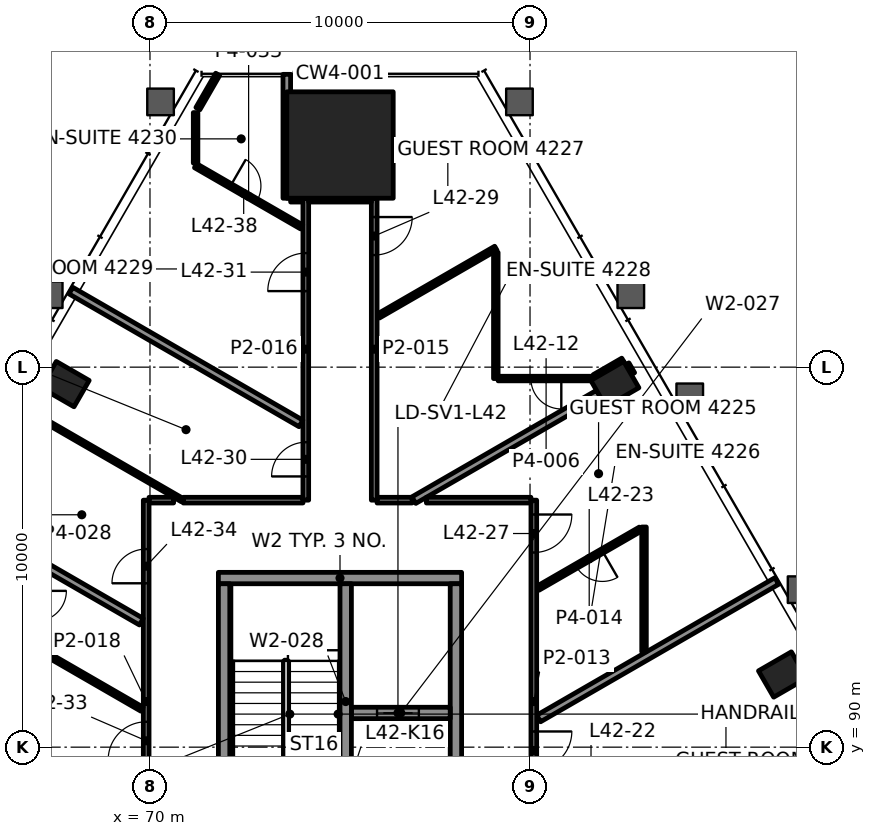
"""IFC4 building model, lengths in metres.
Left out: names, types, materials, properties, quantities, classifications, styles, units other than length and angle.
Written with IfcOpenShell. Run it as: python <this file> out.ifc"""

import sys

from ifc_helpers import new_model, si_unit, direction, frame, frame_2d, origin, origin_2d, place, context, subcontext, project, spatial, rectangle, hollow_rectangle, extrude, element, fill, save


model = new_model("IFC4")
c1 = context("Model", 3, precision=1e-05, world=origin(), true_north=direction((0.0, 1.0)))
c2 = subcontext(c1, "Body", "Model", "MODEL_VIEW")
j1 = project(units=[si_unit("LENGTHUNIT", "METRE"), si_unit("PLANEANGLEUNIT", "RADIAN")], contexts=[c1])
p1 = place(None, origin())
s1 = spatial("IfcSite", under=j1, at=p1, CompositionType="ELEMENT")
p2 = place(p1, origin())
s2 = spatial("IfcBuilding", under=s1, at=p2, CompositionType="ELEMENT")
p3 = place(p2, frame((0.0, 0.0, 183.1)))
s3 = spatial("IfcBuildingStorey", under=s2, at=p3, CompositionType="ELEMENT", Elevation=183.1)
p4 = place(p3, frame((75.0, 105.845, 0.0), z_axis=(0.0, 0.0, 1.0), x_axis=(-1.0, 0.0, 0.0)))
e1 = element("IfcColumn", 1, at=p4, inside=s3, PredefinedType="COLUMN", context=c2, shape_type="SweptSolid", body=[
    extrude(rectangle(XDim=2.8, YDim=2.8, at=origin_2d()), origin(), (0.0, 0.0, 1.0), 3.9),
])
for number, where, z_axis, x_axis in (
    (2, (86.645, 91.912, -0.0), (0.0, 0.0, 1.0), (-0.5, 0.866, 0.0)),
    (3, (82.232, 99.553, -0.0), (0.0, 0.0, 1.0), (-0.5, 0.866, 0.0)),
    (4, (67.768, 99.553, -0.0), (0.0, 0.0, 1.0), (-0.5, -0.866, 0.0)),
):
    element("IfcColumn", number, at=place(p3, frame(where, z_axis=z_axis, x_axis=x_axis)), inside=s3, PredefinedType="COLUMN", context=c2, shape_type="SweptSolid", body=[
        extrude(hollow_rectangle(XDim=0.8, YDim=1.0, WallThickness=0.05, at=origin_2d()), origin(), (0.0, 0.0, 1.0), 3.9),
    ])
p5 = place(p3, frame((71.8, 94.45, 0.0), z_axis=(0.0, 0.0, 1.0), x_axis=(1.0, 0.0, 0.0)))
e5 = element("IfcWall", 5, at=p5, inside=s3, PredefinedType="SHEAR", context=c2, shape_type="SweptSolid", body=[
    extrude(rectangle(XDim=6.4, YDim=0.3, at=frame_2d((3.2, 0.0))), origin(), (0.0, 0.0, 1.0), 3.7),
])
for number, where, z_axis, x_axis in (
    (6, (71.95, 88.1, 0.0), (0.0, 0.0, 1.0), (0.0, 1.0, 0.0)),
    (7, (78.05, 88.1, 0.0), (0.0, 0.0, 1.0), (0.0, 1.0, 0.0)),
):
    element("IfcWall", number, at=place(p3, frame(where, z_axis=z_axis, x_axis=x_axis)), inside=s3, PredefinedType="SHEAR", context=c2, shape_type="SweptSolid", body=[
        extrude(rectangle(XDim=6.2, YDim=0.3, at=frame_2d((3.1, 0.0))), origin(), (0.0, 0.0, 1.0), 3.7),
    ])
p6 = place(p3, frame((75.3, 90.9, 0.0), z_axis=(0.0, 0.0, 1.0), x_axis=(1.0, 0.0, 0.0)))
e8 = element("IfcWall", 8, at=p6, inside=s3, PredefinedType="SHEAR", context=c2, shape_type="SweptSolid", body=[
    extrude(rectangle(XDim=2.6, YDim=0.3, at=frame_2d((1.3, 0.0))), origin(), (0.0, 0.0, 1.0), 3.7),
])
p7 = place(p6, frame((0.675, 0.0, 0.0)))
e9 = element("IfcOpeningElement", 9, at=p7, cuts=e8, PredefinedType="OPENING", context=c2, shape_type="SweptSolid", body=[
    extrude(rectangle(XDim=1.1, YDim=2.1, at=frame_2d((0.55, 1.05))), frame((0.0, 0.16, 0.0), z_axis=(0.0, -1.0, 0.0), x_axis=(1.0, 0.0, 0.0)), (0.0, 0.0, 1.0), 0.32),
])
p8 = place(p3, frame((75.15, 88.1, 0.0), z_axis=(0.0, 0.0, 1.0), x_axis=(0.0, 1.0, 0.0)))
e10 = element("IfcWall", 10, at=p8, inside=s3, PredefinedType="SHEAR", context=c2, shape_type="SweptSolid", body=[
    extrude(rectangle(XDim=6.2, YDim=0.3, at=frame_2d((3.1, 0.0))), origin(), (0.0, 0.0, 1.0), 3.7),
])
p9 = place(p8, frame((0.185, 0.0, 0.0)))
e11 = element("IfcOpeningElement", 11, at=p9, cuts=e10, PredefinedType="OPENING", context=c2, shape_type="SweptSolid", body=[
    extrude(rectangle(XDim=1.0, YDim=2.1, at=frame_2d((0.5, 1.05))), frame((0.0, 0.16, 0.0), z_axis=(0.0, -1.0, 0.0), x_axis=(1.0, 0.0, 0.0)), (0.0, 0.0, 1.0), 0.32),
])
p10 = place(p3, frame((69.975, 96.5, 0.0), z_axis=(0.0, 0.0, 1.0), x_axis=(1.0, 0.0, 0.0)))
e12 = element("IfcWall", 12, at=p10, inside=s3, PredefinedType="PARTITIONING", context=c2, shape_type="SweptSolid", body=[
    extrude(rectangle(XDim=0.646, YDim=0.15, at=frame_2d((0.323, 0.0))), origin(), (0.0, 0.0, 1.0), 3.1),
])
p11 = place(p3, frame((75.975, 96.5, 0.0), z_axis=(0.0, 0.0, 1.0), x_axis=(1.0, 0.0, 0.0)))
e13 = element("IfcWall", 13, at=p11, inside=s3, PredefinedType="PARTITIONING", context=c2, shape_type="SweptSolid", body=[
    extrude(rectangle(XDim=0.925, YDim=0.15, at=frame_2d((0.463, 0.0))), origin(), (0.0, 0.0, 1.0), 3.1),
])
p12 = place(p3, frame((81.686, 99.7, 0.0), z_axis=(0.0, 0.0, 1.0), x_axis=(-1.0, 0.0, 0.0)))
e14 = element("IfcWall", 14, at=p12, inside=s3, PredefinedType="PARTITIONING", context=c2, shape_type="SweptSolid", body=[
    extrude(rectangle(XDim=2.526, YDim=0.12, at=frame_2d((1.263, 0.0))), origin(), (0.0, 0.0, 1.0), 3.1),
])
p13 = place(p12, frame((0.863, 0.0, 0.0)))
e15 = element("IfcOpeningElement", 15, at=p13, cuts=e14, PredefinedType="OPENING", context=c2, shape_type="SweptSolid", body=[
    extrude(rectangle(XDim=0.8, YDim=2.1, at=frame_2d((0.4, 1.05))), frame((0.0, 0.07, 0.0), z_axis=(0.0, -1.0, 0.0), x_axis=(1.0, 0.0, 0.0)), (0.0, 0.0, 1.0), 0.14),
])
p14 = place(p3, frame((73.7, 104.445, 0.0), z_axis=(0.0, 0.0, 1.0), x_axis=(1.0, 0.0, 0.0)))
e16 = element("IfcWall", 16, at=p14, inside=s3, PredefinedType="PARTITIONING", context=c2, shape_type="SweptSolid", body=[
    extrude(rectangle(XDim=0.324, YDim=0.2, at=frame_2d((0.162, 0.0))), origin(), (0.0, 0.0, 1.0), 3.1),
])
p15 = place(p3, frame((80.227, 90.754, 0.0), z_axis=(0.0, 0.0, 1.0), x_axis=(0.866019288795, 0.500010591322, 0.0)))
e17 = element("IfcWall", 17, at=p15, inside=s3, PredefinedType="PARTITIONING", context=c2, shape_type="SweptSolid", body=[
    extrude(rectangle(XDim=7.237, YDim=0.2, at=frame_2d((3.618, 0.0))), origin(), (0.0, 0.0, 1.0), 3.022),
])
p16 = place(p3, frame((82.905, 95.739, 0.0), z_axis=(0.0, 0.0, 1.0), x_axis=(-0.866028856698, -0.499994019331, 0.0)))
e18 = element("IfcWall", 18, at=p16, inside=s3, PredefinedType="PARTITIONING", context=c2, shape_type="SweptSolid", body=[
    extrude(rectangle(XDim=3.113, YDim=0.12, at=frame_2d((1.556, 0.0))), origin(), (0.0, 0.0, 1.0), 3.1),
])
p17 = place(p16, frame((1.156, 0.0, 0.0)))
e19 = element("IfcOpeningElement", 19, at=p17, cuts=e18, PredefinedType="OPENING", context=c2, shape_type="SweptSolid", body=[
    extrude(rectangle(XDim=0.8, YDim=2.1, at=frame_2d((0.4, 1.05))), frame((0.0, 0.07, 0.0), z_axis=(0.0, -1.0, 0.0), x_axis=(1.0, 0.0, 0.0)), (0.0, 0.0, 1.0), 0.14),
])
p18 = place(p3, frame((76.943, 96.5, 0.0), z_axis=(0.0, 0.0, 1.0), x_axis=(0.866015917575, 0.500016430238, 0.0)))
e20 = element("IfcWall", 20, at=p18, inside=s3, PredefinedType="PARTITIONING", context=c2, shape_type="SweptSolid", body=[
    extrude(rectangle(XDim=5.607, YDim=0.2, at=frame_2d((2.804, 0.0))), origin(), (0.0, 0.0, 1.0), 3.1),
])
p19 = place(p3, frame((81.712, 99.715, 0.0), z_axis=(0.0, 0.0, 1.0), x_axis=(0.866092063448, 0.499884524299, 0.0)))
e21 = element("IfcWall", 21, at=p19, inside=s3, PredefinedType="PARTITIONING", context=c2, shape_type="SweptSolid", body=[
    extrude(rectangle(XDim=0.869, YDim=0.2, at=frame_2d((0.435, 0.0))), origin(), (0.0, 0.0, 1.0), 3.1),
])
p20 = place(p3, frame((76.01, 101.346, 0.0), z_axis=(0.0, 0.0, 1.0), x_axis=(0.866045460162, 0.499965259726, 0.0)))
e22 = element("IfcWall", 22, at=p20, inside=s3, PredefinedType="PARTITIONING", context=c2, shape_type="SweptSolid", body=[
    extrude(rectangle(XDim=3.569, YDim=0.12, at=frame_2d((1.784, 0.0))), origin(), (0.0, 0.0, 1.0), 3.1),
])
p21 = place(p3, frame((71.26, 106.802, 0.0), z_axis=(0.0, 0.0, 1.0), x_axis=(0.500094169602, 0.865971028112, 0.0)))
e23 = element("IfcWall", 23, at=p21, inside=s3, PredefinedType="PARTITIONING", context=c2, shape_type="SweptSolid", body=[
    extrude(rectangle(XDim=1.042, YDim=0.12, at=frame_2d((0.521, 0.0))), origin(), (0.0, 0.0, 1.0), 3.1),
])
p22 = place(p3, frame((83.0, 92.51, 0.0), z_axis=(0.0, 0.0, 1.0), x_axis=(0.0, 1.0, 0.0)))
e24 = element("IfcWall", 24, at=p22, inside=s3, PredefinedType="PARTITIONING", context=c2, shape_type="SweptSolid", body=[
    extrude(rectangle(XDim=3.283, YDim=0.12, at=frame_2d((1.642, 0.0))), origin(), (0.0, 0.0, 1.0), 3.1),
])
p23 = place(p3, frame((80.1, 96.5, 0.0), z_axis=(0.0, 0.0, 1.0), x_axis=(0.0, -1.0, 0.0)))
e25 = element("IfcWall", 25, at=p23, inside=s3, PredefinedType="PARTITIONING", context=c2, shape_type="SweptSolid", body=[
    extrude(rectangle(XDim=10.6, YDim=0.15, at=frame_2d((5.3, 0.0))), origin(), (0.0, 0.0, 1.0), 3.022),
])
p24 = place(p23, frame((0.377, 0.0, 0.0)))
e26 = element("IfcOpeningElement", 26, at=p24, cuts=e25, PredefinedType="OPENING", context=c2, shape_type="SweptSolid", body=[
    extrude(rectangle(XDim=1.0, YDim=2.1, at=frame_2d((0.5, 1.05))), frame((0.0, 0.085, 0.0), z_axis=(0.0, -1.0, 0.0), x_axis=(1.0, 0.0, 0.0)), (0.0, 0.0, 1.0), 0.17),
])
p25 = place(p23, frame((6.087, 0.0, 0.0)))
e27 = element("IfcOpeningElement", 27, at=p25, cuts=e25, PredefinedType="OPENING", context=c2, shape_type="SweptSolid", body=[
    extrude(rectangle(XDim=1.0, YDim=2.1, at=frame_2d((0.5, 1.05))), frame((0.0, 0.085, 0.0), z_axis=(0.0, -1.0, 0.0), x_axis=(1.0, 0.0, 0.0)), (0.0, 0.0, 1.0), 0.17),
])
p26 = place(p3, frame((79.1, 99.7, 0.0), z_axis=(0.0, 0.0, 1.0), x_axis=(0.0, 1.0, 0.0)))
e28 = element("IfcWall", 28, at=p26, inside=s3, PredefinedType="PARTITIONING", context=c2, shape_type="SweptSolid", body=[
    extrude(rectangle(XDim=3.321, YDim=0.12, at=frame_2d((1.661, 0.0))), origin(), (0.0, 0.0, 1.0), 3.1),
])
p27 = place(p3, frame((75.9, 104.445, 0.0), z_axis=(0.0, 0.0, 1.0), x_axis=(0.0, -1.0, 0.0)))
e29 = element("IfcWall", 29, at=p27, inside=s3, PredefinedType="PARTITIONING", context=c2, shape_type="SweptSolid", body=[
    extrude(rectangle(XDim=7.945, YDim=0.15, at=frame_2d((3.972, 0.0))), origin(), (0.0, 0.0, 1.0), 3.1),
])
p28 = place(p27, frame((0.495, 0.0, 0.0)))
e30 = element("IfcOpeningElement", 30, at=p28, cuts=e29, PredefinedType="OPENING", context=c2, shape_type="SweptSolid", body=[
    extrude(rectangle(XDim=1.0, YDim=2.1, at=frame_2d((0.5, 1.05))), frame((0.0, 0.085, 0.0), z_axis=(0.0, -1.0, 0.0), x_axis=(1.0, 0.0, 0.0)), (0.0, 0.0, 1.0), 0.17),
])
p29 = place(p3, frame((74.1, 96.5, 0.0), z_axis=(0.0, 0.0, 1.0), x_axis=(0.0, 1.0, 0.0)))
e31 = element("IfcWall", 31, at=p29, inside=s3, PredefinedType="PARTITIONING", context=c2, shape_type="SweptSolid", body=[
    extrude(rectangle(XDim=7.945, YDim=0.15, at=frame_2d((3.973, 0.0))), origin(), (0.0, 0.0, 1.0), 3.1),
])
p30 = place(p29, frame((0.624, 0.0, 0.0)))
e32 = element("IfcOpeningElement", 32, at=p30, cuts=e31, PredefinedType="OPENING", context=c2, shape_type="SweptSolid", body=[
    extrude(rectangle(XDim=0.9, YDim=2.1, at=frame_2d((0.45, 1.05))), frame((0.0, 0.085, 0.0), z_axis=(0.0, -1.0, 0.0), x_axis=(1.0, 0.0, 0.0)), (0.0, 0.0, 1.0), 0.17),
])
p31 = place(p29, frame((5.501, 0.0, 0.0)))
e33 = element("IfcOpeningElement", 33, at=p31, cuts=e31, PredefinedType="OPENING", context=c2, shape_type="SweptSolid", body=[
    extrude(rectangle(XDim=1.0, YDim=2.1, at=frame_2d((0.5, 1.05))), frame((0.0, 0.085, 0.0), z_axis=(0.0, -1.0, 0.0), x_axis=(1.0, 0.0, 0.0)), (0.0, 0.0, 1.0), 0.17),
])
p32 = place(p3, frame((73.6, 104.446, 0.0), z_axis=(0.0, 0.0, 1.0), x_axis=(0.0, 1.0, 0.0)))
e34 = element("IfcWall", 34, at=p32, inside=s3, PredefinedType="PARTITIONING", context=c2, shape_type="SweptSolid", body=[
    extrude(rectangle(XDim=3.259, YDim=0.2, at=frame_2d((1.63, 0.0))), origin(), (0.0, 0.0, 1.0), 3.1),
])
p33 = place(p3, frame((71.2, 105.369, 0.0), z_axis=(0.0, 0.0, 1.0), x_axis=(0.0, 1.0, 0.0)))
e35 = element("IfcWall", 35, at=p33, inside=s3, PredefinedType="PARTITIONING", context=c2, shape_type="SweptSolid", body=[
    extrude(rectangle(XDim=1.329, YDim=0.12, at=frame_2d((0.665, 0.0))), origin(), (0.0, 0.0, 1.0), 3.1),
])
p34 = place(p3, frame((69.9, 85.9, 0.0), z_axis=(0.0, 0.0, 1.0), x_axis=(0.0, 1.0, 0.0)))
e36 = element("IfcWall", 36, at=p34, inside=s3, PredefinedType="PARTITIONING", context=c2, shape_type="SweptSolid", body=[
    extrude(rectangle(XDim=10.6, YDim=0.15, at=frame_2d((5.3, 0.0))), origin(), (0.0, 0.0, 1.0), 3.022),
])
p35 = place(p34, frame((3.767, 0.0, 0.0)))
e37 = element("IfcOpeningElement", 37, at=p35, cuts=e36, PredefinedType="OPENING", context=c2, shape_type="SweptSolid", body=[
    extrude(rectangle(XDim=1.0, YDim=2.1, at=frame_2d((0.5, 1.05))), frame((0.0, 0.085, 0.0), z_axis=(0.0, -1.0, 0.0), x_axis=(1.0, 0.0, 0.0)), (0.0, 0.0, 1.0), 0.17),
])
p36 = place(p34, frame((8.412, 0.0, 0.0)))
e38 = element("IfcOpeningElement", 38, at=p36, cuts=e36, PredefinedType="OPENING", context=c2, shape_type="SweptSolid", body=[
    extrude(rectangle(XDim=0.9, YDim=2.1, at=frame_2d((0.45, 1.05))), frame((0.0, 0.085, 0.0), z_axis=(0.0, -1.0, 0.0), x_axis=(1.0, 0.0, 0.0)), (0.0, 0.0, 1.0), 0.17),
])
p37 = place(p3, frame((82.665, 99.803, 0.0), z_axis=(0.0, 0.0, 1.0), x_axis=(-0.499910707084, 0.866076950936, 0.0)))
e39 = element("IfcWall", 39, at=p37, inside=s3, PredefinedType="PARTITIONING", context=c2, shape_type="SweptSolid", body=[
    extrude(rectangle(XDim=0.299, YDim=0.2, at=frame_2d((0.15, 0.0))), origin(), (0.0, 0.0, 1.0), 3.1),
])
p38 = place(p3, frame((71.2, 105.301, 0.0), z_axis=(0.0, 0.0, 1.0), x_axis=(0.866010186656, -0.500026355914, 0.0)))
e40 = element("IfcWall", 40, at=p38, inside=s3, PredefinedType="PARTITIONING", context=c2, shape_type="SweptSolid", body=[
    extrude(rectangle(XDim=3.222, YDim=0.12, at=frame_2d((1.611, 0.0))), origin(), (0.0, 0.0, 1.0), 3.1),
])
p39 = place(p38, frame((1.061, 0.0, 0.0)))
e41 = element("IfcOpeningElement", 41, at=p39, cuts=e40, PredefinedType="OPENING", context=c2, shape_type="SweptSolid", body=[
    extrude(rectangle(XDim=0.8, YDim=2.1, at=frame_2d((0.4, 1.05))), frame((0.0, 0.07, 0.0), z_axis=(0.0, -1.0, 0.0), x_axis=(1.0, 0.0, 0.0)), (0.0, 0.0, 1.0), 0.14),
])
p40 = place(p3, frame((73.973, 98.518, 0.0), z_axis=(0.0, 0.0, 1.0), x_axis=(-0.866016957496, 0.500014629116, 0.0)))
e42 = element("IfcWall", 42, at=p40, inside=s3, PredefinedType="PARTITIONING", context=c2, shape_type="SweptSolid", body=[
    extrude(rectangle(XDim=6.992, YDim=0.2, at=frame_2d((3.496, 0.0))), origin(), (0.0, 0.0, 1.0), 3.1),
])
p41 = place(p3, frame((70.851, 96.5, 0.0), z_axis=(0.0, 0.0, 1.0), x_axis=(-0.866016914842, 0.500014702992, 0.0)))
e43 = element("IfcWall", 43, at=p41, inside=s3, PredefinedType="PARTITIONING", context=c2, shape_type="SweptSolid", body=[
    extrude(rectangle(XDim=4.797, YDim=0.1, at=frame_2d((2.398, 0.0))), origin(), (0.0, 0.0, 1.0), 3.022),
])
p42 = place(p3, frame((69.773, 93.302, 0.0), z_axis=(0.0, 0.0, 1.0), x_axis=(-0.866046692957, 0.499963124258, 0.0)))
e44 = element("IfcWall", 44, at=p42, inside=s3, PredefinedType="PARTITIONING", context=c2, shape_type="SweptSolid", body=[
    extrude(rectangle(XDim=4.01, YDim=0.2, at=frame_2d((2.005, 0.0))), origin(), (0.0, 0.0, 1.0), 3.1),
])
p43 = place(p3, frame((69.79, 90.998, 0.0), z_axis=(0.0, 0.0, 1.0), x_axis=(-0.866029130051, 0.499993545862, 0.0)))
e45 = element("IfcWall", 45, at=p43, inside=s3, PredefinedType="PARTITIONING", context=c2, shape_type="SweptSolid", body=[
    extrude(rectangle(XDim=3.222, YDim=0.12, at=frame_2d((1.611, 0.0))), origin(), (0.0, 0.0, 1.0), 3.1),
])
p44 = place(p3, frame((69.799, 88.192, 0.0), z_axis=(0.0, 0.0, 1.0), x_axis=(-0.866013353477, 0.500020871164, 0.0)))
e46 = element("IfcWall", 46, at=p44, inside=s3, PredefinedType="PARTITIONING", context=c2, shape_type="SweptSolid", body=[
    extrude(rectangle(XDim=6.94, YDim=0.1, at=frame_2d((3.47, 0.0))), origin(), (0.0, 0.0, 1.0), 3.022),
])
p45 = place(p3, frame((70.875, 96.5, 0.0), z_axis=(0.0, 0.0, 1.0), x_axis=(1.0, 0.0, 0.0)))
e47 = element("IfcWall", 47, at=p45, inside=s3, PredefinedType="PARTITIONING", context=c2, shape_type="SweptSolid", body=[
    extrude(rectangle(XDim=3.149, YDim=0.15, at=frame_2d((1.575, 0.0))), origin(), (0.0, 0.0, 1.0), 3.1),
])
p46 = place(p3, frame((77.273, 96.5, 0.0), z_axis=(0.0, 0.0, 1.0), x_axis=(1.0, 0.0, 0.0)))
e48 = element("IfcWall", 48, at=p46, inside=s3, PredefinedType="PARTITIONING", context=c2, shape_type="SweptSolid", body=[
    extrude(rectangle(XDim=2.752, YDim=0.15, at=frame_2d((1.376, 0.0))), origin(), (0.0, 0.0, 1.0), 3.1),
])
p47 = place(p3, frame((74.175, 104.445, 0.0), z_axis=(0.0, 0.0, 1.0), x_axis=(1.0, 0.0, 0.0)))
e49 = element("IfcWall", 49, at=p47, inside=s3, PredefinedType="PARTITIONING", context=c2, shape_type="SweptSolid", body=[
    extrude(rectangle(XDim=1.649, YDim=0.2, at=frame_2d((0.825, 0.0))), origin(), (0.0, 0.0, 1.0), 3.097),
])
p48 = place(p13, origin())
e50 = element("IfcDoor", 50, at=p48, inside=s3, OperationType="SINGLE_SWING_RIGHT", PredefinedType="DOOR", context=c2, shape_type="SweptSolid", body=[
    extrude(rectangle(XDim=0.8, YDim=2.1, at=frame_2d((0.4, 1.05))), frame((0.0, 0.025, 0.0), z_axis=(0.0, -1.0, 0.0), x_axis=(1.0, 0.0, 0.0)), (0.0, 0.0, 1.0), 0.05),
])
fill(e15, e50)
p49 = place(p17, origin())
e51 = element("IfcDoor", 51, at=p49, inside=s3, OperationType="SINGLE_SWING_RIGHT", PredefinedType="DOOR", context=c2, shape_type="SweptSolid", body=[
    extrude(rectangle(XDim=0.8, YDim=2.1, at=frame_2d((0.4, 1.05))), frame((0.0, 0.025, 0.0), z_axis=(0.0, -1.0, 0.0), x_axis=(1.0, 0.0, 0.0)), (0.0, 0.0, 1.0), 0.05),
])
fill(e19, e51)
p50 = place(p24, origin())
e52 = element("IfcDoor", 52, at=p50, inside=s3, OperationType="SINGLE_SWING_LEFT", PredefinedType="DOOR", context=c2, shape_type="SweptSolid", body=[
    extrude(rectangle(XDim=1.0, YDim=2.1, at=frame_2d((0.5, 1.05))), frame((0.0, 0.025, 0.0), z_axis=(0.0, -1.0, 0.0), x_axis=(1.0, 0.0, 0.0)), (0.0, 0.0, 1.0), 0.05),
])
fill(e26, e52)
p51 = place(p25, origin())
e53 = element("IfcDoor", 53, at=p51, inside=s3, OperationType="SINGLE_SWING_LEFT", PredefinedType="DOOR", context=c2, shape_type="SweptSolid", body=[
    extrude(rectangle(XDim=1.0, YDim=2.1, at=frame_2d((0.5, 1.05))), frame((0.0, 0.025, 0.0), z_axis=(0.0, -1.0, 0.0), x_axis=(1.0, 0.0, 0.0)), (0.0, 0.0, 1.0), 0.05),
])
fill(e27, e53)
p52 = place(p28, origin())
e54 = element("IfcDoor", 54, at=p52, inside=s3, OperationType="SINGLE_SWING_LEFT", PredefinedType="DOOR", context=c2, shape_type="SweptSolid", body=[
    extrude(rectangle(XDim=1.0, YDim=2.1, at=frame_2d((0.5, 1.05))), frame((0.0, 0.025, 0.0), z_axis=(0.0, -1.0, 0.0), x_axis=(1.0, 0.0, 0.0)), (0.0, 0.0, 1.0), 0.05),
])
fill(e30, e54)
p53 = place(p30, origin())
e55 = element("IfcDoor", 55, at=p53, inside=s3, OperationType="SINGLE_SWING_RIGHT", PredefinedType="DOOR", context=c2, shape_type="SweptSolid", body=[
    extrude(rectangle(XDim=0.9, YDim=2.1, at=frame_2d((0.45, 1.05))), frame((0.0, 0.025, 0.0), z_axis=(0.0, -1.0, 0.0), x_axis=(1.0, 0.0, 0.0)), (0.0, 0.0, 1.0), 0.05),
])
fill(e32, e55)
p54 = place(p31, origin())
e56 = element("IfcDoor", 56, at=p54, inside=s3, OperationType="SINGLE_SWING_RIGHT", PredefinedType="DOOR", context=c2, shape_type="SweptSolid", body=[
    extrude(rectangle(XDim=1.0, YDim=2.1, at=frame_2d((0.5, 1.05))), frame((0.0, 0.025, 0.0), z_axis=(0.0, -1.0, 0.0), x_axis=(1.0, 0.0, 0.0)), (0.0, 0.0, 1.0), 0.05),
])
fill(e33, e56)
p55 = place(p35, origin())
e57 = element("IfcDoor", 57, at=p55, inside=s3, OperationType="SINGLE_SWING_RIGHT", PredefinedType="DOOR", context=c2, shape_type="SweptSolid", body=[
    extrude(rectangle(XDim=1.0, YDim=2.1, at=frame_2d((0.5, 1.05))), frame((0.0, 0.025, 0.0), z_axis=(0.0, -1.0, 0.0), x_axis=(1.0, 0.0, 0.0)), (0.0, 0.0, 1.0), 0.05),
])
fill(e37, e57)
p56 = place(p36, origin())
e58 = element("IfcDoor", 58, at=p56, inside=s3, OperationType="SINGLE_SWING_LEFT", PredefinedType="DOOR", context=c2, shape_type="SweptSolid", body=[
    extrude(rectangle(XDim=0.9, YDim=2.1, at=frame_2d((0.45, 1.05))), frame((0.0, 0.025, 0.0), z_axis=(0.0, -1.0, 0.0), x_axis=(1.0, 0.0, 0.0)), (0.0, 0.0, 1.0), 0.05),
])
fill(e38, e58)
p57 = place(p39, origin())
e59 = element("IfcDoor", 59, at=p57, inside=s3, OperationType="SINGLE_SWING_RIGHT", PredefinedType="DOOR", context=c2, shape_type="SweptSolid", body=[
    extrude(rectangle(XDim=0.8, YDim=2.1, at=frame_2d((0.4, 1.05))), frame((0.0, 0.025, 0.0), z_axis=(0.0, -1.0, 0.0), x_axis=(1.0, 0.0, 0.0)), (0.0, 0.0, 1.0), 0.05),
])
fill(e41, e59)
p58 = place(p3, origin())
p59 = place(p58, frame((86.136, 95.083, 0.15), z_axis=(0.0, 0.0, 1.0), x_axis=(-0.5, 0.866025, 0.0)))
p60 = place(p59, origin())
e60 = element("IfcWindow", 60, at=p60, inside=s3, PartitioningType="SINGLE_PANEL", PredefinedType="WINDOW", context=c2, shape_type="SweptSolid", body=[
    extrude(rectangle(XDim=2.866, YDim=3.55, at=frame_2d((1.433, 1.775))), frame((0.0, 0.03, 0.0), z_axis=(0.0, -1.0, 0.0), x_axis=(1.0, 0.0, 0.0)), (0.0, 0.0, 1.0), 0.06),
])
p61 = place(p58, frame((69.716, 105.219, 0.15), z_axis=(0.0, 0.0, 1.0), x_axis=(-0.5, -0.866025, 0.0)))
p62 = place(p61, origin())
e61 = element("IfcWindow", 61, at=p62, inside=s3, PartitioningType="SINGLE_PANEL", PredefinedType="WINDOW", context=c2, shape_type="SweptSolid", body=[
    extrude(rectangle(XDim=2.866, YDim=3.55, at=frame_2d((1.433, 1.775))), frame((0.0, 0.03, 0.0), z_axis=(0.0, -1.0, 0.0), x_axis=(1.0, 0.0, 0.0)), (0.0, 0.0, 1.0), 0.06),
])
p63 = place(p7, origin())
e62 = element("IfcDoor", 62, at=p63, inside=s3, OperationType="DOUBLE_DOOR_SLIDING", PredefinedType="DOOR", context=c2, shape_type="SweptSolid", body=[
    extrude(rectangle(XDim=1.1, YDim=2.1, at=frame_2d((0.55, 1.05))), frame((0.0, 0.025, 0.0), z_axis=(0.0, -1.0, 0.0), x_axis=(1.0, 0.0, 0.0)), (0.0, 0.0, 1.0), 0.05),
])
fill(e9, e62)
save(model, sys.argv[1])
